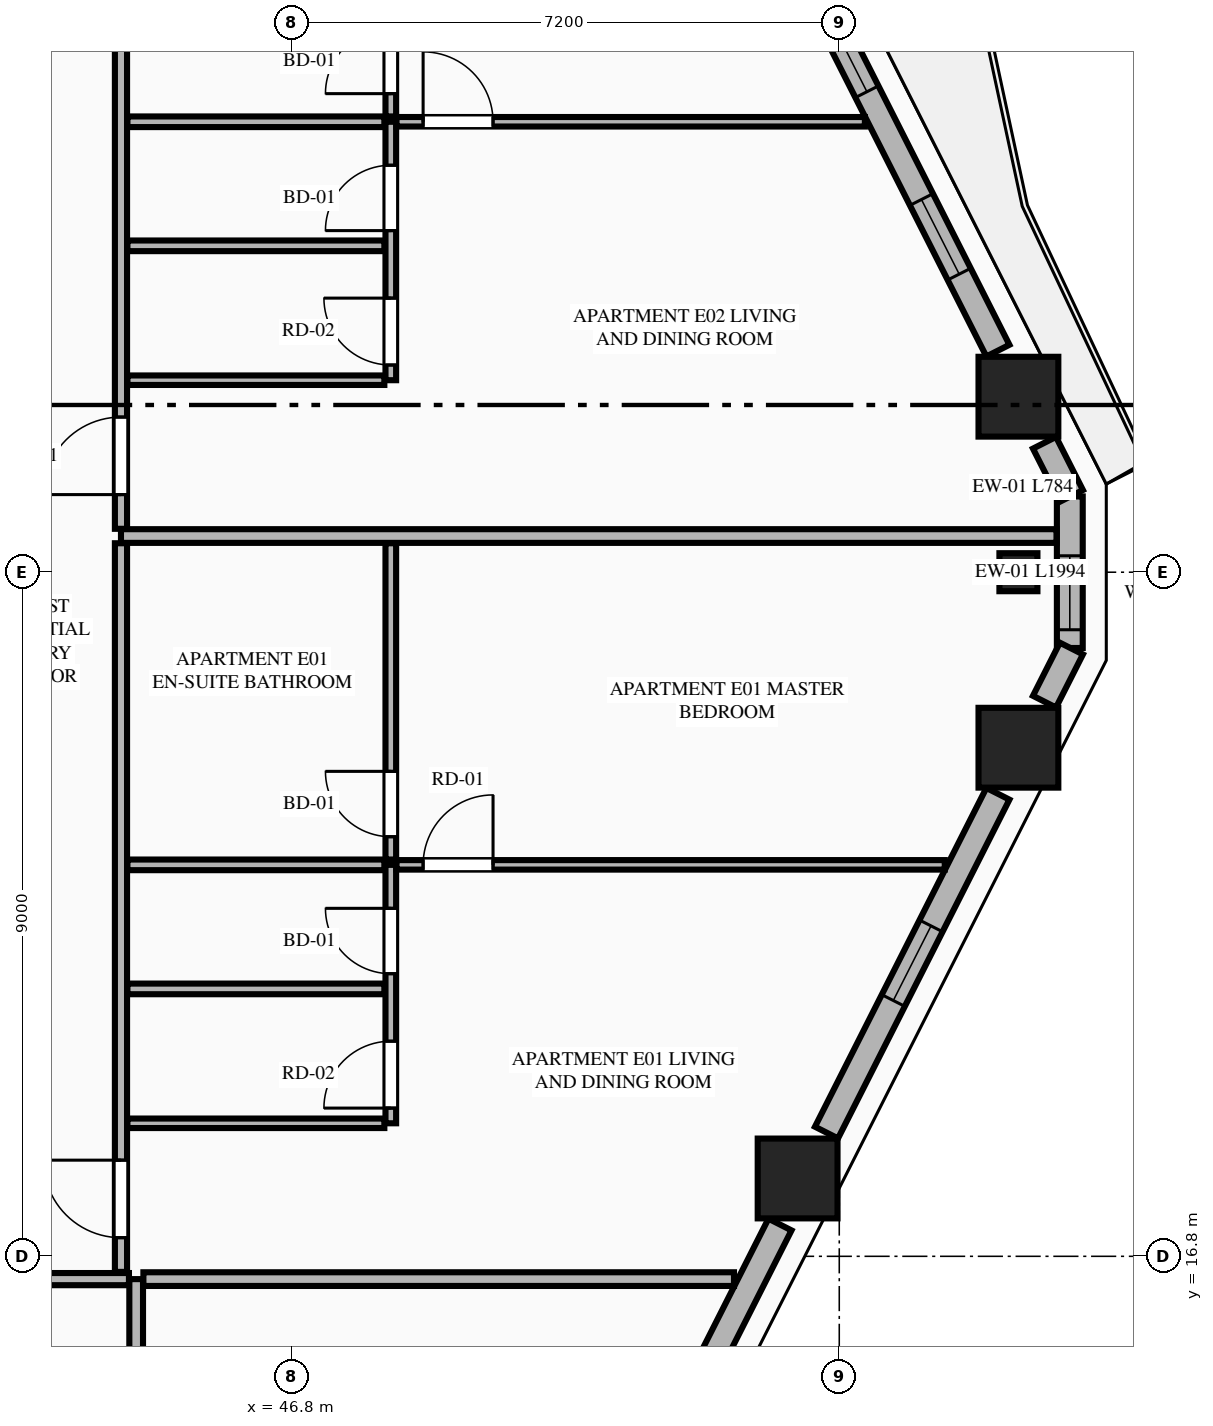
"""IFC4 building model, lengths in metres.
Left out: names, types, materials, properties, quantities, classifications, styles, units other than length and angle.
Written with IfcOpenShell. Run it as: python <this file> out.ifc"""

import sys

from ifc_helpers import new_model, si_unit, direction, frame, frame_2d, origin, origin_2d, place, context, subcontext, project, spatial, rectangle, extrude, element, fill, save


model = new_model("IFC4")
c1 = context("Model", 3, precision=1e-05, world=origin(), true_north=direction((0.0, 1.0)))
c2 = subcontext(c1, "Body", "Model", "MODEL_VIEW")
j1 = project(units=[si_unit("LENGTHUNIT", "METRE"), si_unit("PLANEANGLEUNIT", "RADIAN")], contexts=[c1])
p1 = place(None, origin())
s1 = spatial("IfcSite", under=j1, at=p1, CompositionType="ELEMENT")
p2 = place(p1, origin())
s2 = spatial("IfcBuilding", under=s1, at=p2, CompositionType="ELEMENT")
p3 = place(p2, frame((0.0, 0.0, 109.05)))
s3 = spatial("IfcBuildingStorey", under=s2, at=p3, CompositionType="ELEMENT", Elevation=109.05)
for number, where, z_axis, x_axis in (
    (1, (53.452, 17.824, 0.0), (0.0, 0.0, 1.0), (1.0, 0.0, 0.0)),
    (2, (56.357, 23.491, 0.0), (0.0, 0.0, 1.0), (1.0, 0.0, 0.0)),
    (3, (56.357, 28.109, 0.0), (0.0, 0.0, 1.0), (1.0, 0.0, 0.0)),
):
    element("IfcColumn", number, at=place(p3, frame(where, z_axis=z_axis, x_axis=x_axis)), inside=s3, PredefinedType="COLUMN", context=c2, shape_type="SweptSolid", body=[
        extrude(rectangle(XDim=1.05, YDim=1.05, at=origin_2d()), origin(), (0.0, 0.0, 1.0), 3.55),
    ])
p4 = place(p3, frame((56.357, 25.8, 0.0), z_axis=(0.0, 0.0, 1.0), x_axis=(0.0, 1.0, 0.0)))
e4 = element("IfcColumn", 4, at=p4, inside=s3, PredefinedType="PILASTER", context=c2, shape_type="SweptSolid", body=[
    extrude(rectangle(XDim=0.5, YDim=0.35, at=origin_2d()), origin(), (0.0, 0.0, 1.0), 3.55),
])
p5 = place(p3, frame((57.033, 24.803, 0.0), z_axis=(0.0, 0.0, 1.0), x_axis=(0.0, 1.0, 0.0)))
e5 = element("IfcWall", 5, at=p5, inside=s3, PredefinedType="STANDARD", context=c2, shape_type="SweptSolid", body=[
    extrude(rectangle(XDim=1.994, YDim=0.34, at=frame_2d((0.997, 0.0))), origin(), (0.0, 0.0, 1.0), 3.34),
])
p6 = place(p5, frame((0.24, 0.0, 0.75)))
e6 = element("IfcOpeningElement", 6, at=p6, cuts=e5, PredefinedType="OPENING", context=c2, shape_type="SweptSolid", body=[
    extrude(rectangle(XDim=0.973, YDim=2.0, at=frame_2d((0.486, 1.0))), frame((0.0, 0.18, 0.0), z_axis=(0.0, -1.0, 0.0), x_axis=(1.0, 0.0, 0.0)), (0.0, 0.0, 1.0), 0.36),
])
p7 = place(p3, frame((50.863, 12.561, 0.0), z_axis=(0.0, 0.0, 1.0), x_axis=(0.451567731634, 0.892236842855, 0.0)))
e7 = element("IfcWall", 7, at=p7, inside=s3, PredefinedType="STANDARD", context=c2, shape_type="SweptSolid", body=[
    extrude(rectangle(XDim=5.219, YDim=0.34, at=frame_2d((2.61, 0.0))), origin(), (0.0, 0.0, 1.0), 2.797),
])
p8 = place(p7, frame((2.06, 0.0, 0.75)))
e8 = element("IfcOpeningElement", 8, at=p8, cuts=e7, PredefinedType="OPENING", context=c2, shape_type="SweptSolid", body=[
    extrude(rectangle(XDim=1.1, YDim=1.897, at=frame_2d((0.55, 0.948))), frame((0.0, 0.18, 0.0), z_axis=(0.0, -1.0, 0.0), x_axis=(1.0, 0.0, 0.0)), (0.0, 0.0, 1.0), 0.36),
])
p9 = place(p3, frame((53.832, 18.428, 0.0), z_axis=(0.0, 0.0, 1.0), x_axis=(0.451431617681, 0.892305718102, 0.0)))
e9 = element("IfcWall", 9, at=p9, inside=s3, PredefinedType="STANDARD", context=c2, shape_type="SweptSolid", body=[
    extrude(rectangle(XDim=4.995, YDim=0.34, at=frame_2d((2.498, 0.0))), origin(), (0.0, 0.0, 1.0), 2.797),
])
p10 = place(p9, frame((1.947, 0.0, 0.75)))
e10 = element("IfcOpeningElement", 10, at=p10, cuts=e9, PredefinedType="OPENING", context=c2, shape_type="SweptSolid", body=[
    extrude(rectangle(XDim=1.1, YDim=1.897, at=frame_2d((0.55, 0.948))), frame((0.0, 0.18, 0.0), z_axis=(0.0, -1.0, 0.0), x_axis=(1.0, 0.0, 0.0)), (0.0, 0.0, 1.0), 0.36),
])
for number, where, z_axis, x_axis in (
    (11, (56.7, 24.097, 0.0), (0.0, 0.0, 1.0), (0.452, 0.892, 0.0)),
    (12, (57.054, 26.804, 0.0), (0.0, 0.0, 1.0), (-0.452, 0.892, 0.0)),
):
    element("IfcWall", number, at=place(p3, frame(where, z_axis=z_axis, x_axis=x_axis)), inside=s3, PredefinedType="STANDARD", context=c2, shape_type="SweptSolid", body=[
        extrude(rectangle(XDim=0.783, YDim=0.34, at=frame_2d((0.392, 0.0))), origin(), (0.0, 0.0, 1.0), 3.34),
    ])
p11 = place(p3, frame((56.087, 28.715, 0.0), z_axis=(0.0, 0.0, 1.0), x_axis=(-0.451431617681, 0.892305718102, 0.0)))
e13 = element("IfcWall", 13, at=p11, inside=s3, PredefinedType="STANDARD", context=c2, shape_type="SweptSolid", body=[
    extrude(rectangle(XDim=4.995, YDim=0.34, at=frame_2d((2.498, 0.0))), origin(), (0.0, 0.0, 1.0), 2.797),
])
p12 = place(p11, frame((1.128, 0.0, 0.75)))
e14 = element("IfcOpeningElement", 14, at=p12, cuts=e13, PredefinedType="OPENING", context=c2, shape_type="SweptSolid", body=[
    extrude(rectangle(XDim=1.1, YDim=1.897, at=frame_2d((0.55, 0.948))), frame((0.0, 0.18, 0.0), z_axis=(0.0, -1.0, 0.0), x_axis=(1.0, 0.0, 0.0)), (0.0, 0.0, 1.0), 0.36),
])
p13 = place(p11, frame((3.817, 0.0, 0.75)))
e15 = element("IfcOpeningElement", 15, at=p13, cuts=e13, PredefinedType="OPENING", context=c2, shape_type="SweptSolid", body=[
    extrude(rectangle(XDim=0.958, YDim=1.897, at=frame_2d((0.479, 0.948))), frame((0.0, 0.18, 0.0), z_axis=(0.0, -1.0, 0.0), x_axis=(1.0, 0.0, 0.0)), (0.0, 0.0, 1.0), 0.36),
])
p14 = place(p3, frame((44.75, 4.105, 0.0), z_axis=(0.0, 0.0, 1.0), x_axis=(0.0, 1.0, 0.0)))
e16 = element("IfcWall", 16, at=p14, inside=s3, PredefinedType="PARTITIONING", context=c2, shape_type="SweptSolid", body=[
    extrude(rectangle(XDim=12.395, YDim=0.18, at=frame_2d((6.198, 0.0))), origin(), (0.0, 0.0, 1.0), 3.34),
])
p15 = place(p3, frame((36.327, 16.5, 0.0), z_axis=(0.0, 0.0, 1.0), x_axis=(1.0, 0.0, 0.0)))
e17 = element("IfcWall", 17, at=p15, inside=s3, PredefinedType="PARTITIONING", context=c2, shape_type="SweptSolid", body=[
    extrude(rectangle(XDim=8.328, YDim=0.16, at=frame_2d((4.164, 0.0))), origin(), (0.0, 0.0, 1.0), 3.34),
])
p16 = place(p15, frame((6.073, 0.0, 0.0)))
e18 = element("IfcOpeningElement", 18, at=p16, cuts=e17, PredefinedType="OPENING", context=c2, shape_type="SweptSolid", body=[
    extrude(rectangle(XDim=1.02, YDim=2.25, at=frame_2d((0.51, 1.125))), frame((0.0, 0.09, 0.0), z_axis=(0.0, -1.0, 0.0), x_axis=(1.0, 0.0, 0.0)), (0.0, 0.0, 1.0), 0.18),
])
p17 = place(p3, frame((44.845, 16.5, 0.0), z_axis=(0.0, 0.0, 1.0), x_axis=(1.0, 0.0, 0.0)))
e19 = element("IfcWall", 19, at=p17, inside=s3, PredefinedType="PARTITIONING", context=c2, shape_type="SweptSolid", body=[
    extrude(rectangle(XDim=7.77, YDim=0.18, at=frame_2d((3.885, 0.0))), origin(), (0.0, 0.0, 1.0), 3.34),
])
p18 = place(p3, frame((44.55, 16.595, 0.0), z_axis=(0.0, 0.0, 1.0), x_axis=(0.0, 1.0, 0.0)))
e20 = element("IfcWall", 20, at=p18, inside=s3, PredefinedType="PARTITIONING", context=c2, shape_type="SweptSolid", body=[
    extrude(rectangle(XDim=9.586, YDim=0.16, at=frame_2d((4.793, 0.0))), origin(), (0.0, 0.0, 1.0), 3.34),
])
p19 = place(p18, frame((0.45, 0.0, 0.0)))
e21 = element("IfcOpeningElement", 21, at=p19, cuts=e20, PredefinedType="OPENING", context=c2, shape_type="SweptSolid", body=[
    extrude(rectangle(XDim=1.02, YDim=2.25, at=frame_2d((0.51, 1.125))), frame((0.0, 0.09, 0.0), z_axis=(0.0, -1.0, 0.0), x_axis=(1.0, 0.0, 0.0)), (0.0, 0.0, 1.0), 0.18),
])
p20 = place(p3, frame((44.635, 18.55, 0.0), z_axis=(0.0, 0.0, 1.0), x_axis=(1.0, 0.0, 0.0)))
e22 = element("IfcWall", 22, at=p20, inside=s3, PredefinedType="PARTITIONING", context=c2, shape_type="SweptSolid", body=[
    extrude(rectangle(XDim=3.38, YDim=0.125, at=frame_2d((1.69, 0.0))), origin(), (0.0, 0.0, 1.0), 2.722),
])
p21 = place(p3, frame((48.1, 18.55, 0.0), z_axis=(0.0, 0.0, 1.0), x_axis=(0.0, 1.0, 0.0)))
e23 = element("IfcWall", 23, at=p21, inside=s3, PredefinedType="PLUMBINGWALL", context=c2, shape_type="SweptSolid", body=[
    extrude(rectangle(XDim=3.4, YDim=0.14, at=frame_2d((1.7, 0.0))), origin(), (0.0, 0.0, 1.0), 3.34),
])
p22 = place(p21, frame((0.2, 0.0, 0.0)))
e24 = element("IfcOpeningElement", 24, at=p22, cuts=e23, PredefinedType="OPENING", context=c2, shape_type="SweptSolid", body=[
    extrude(rectangle(XDim=0.88, YDim=2.15, at=frame_2d((0.44, 1.075))), frame((0.0, 0.08, 0.0), z_axis=(0.0, -1.0, 0.0), x_axis=(1.0, 0.0, 0.0)), (0.0, 0.0, 1.0), 0.16),
])
p23 = place(p21, frame((1.968, 0.0, 0.0)))
e25 = element("IfcOpeningElement", 25, at=p23, cuts=e23, PredefinedType="OPENING", context=c2, shape_type="SweptSolid", body=[
    extrude(rectangle(XDim=0.86, YDim=2.1, at=frame_2d((0.43, 1.05))), frame((0.0, 0.08, 0.0), z_axis=(0.0, -1.0, 0.0), x_axis=(1.0, 0.0, 0.0)), (0.0, 0.0, 1.0), 0.16),
])
p24 = place(p3, frame((48.1, 22.02, 0.0), z_axis=(0.0, 0.0, 1.0), x_axis=(0.0, 1.0, 0.0)))
e26 = element("IfcWall", 26, at=p24, inside=s3, PredefinedType="PLUMBINGWALL", context=c2, shape_type="SweptSolid", body=[
    extrude(rectangle(XDim=4.161, YDim=0.14, at=frame_2d((2.081, 0.0))), origin(), (0.0, 0.0, 1.0), 3.34),
])
p25 = place(p24, frame((0.3, 0.0, 0.0)))
e27 = element("IfcOpeningElement", 27, at=p25, cuts=e26, PredefinedType="OPENING", context=c2, shape_type="SweptSolid", body=[
    extrude(rectangle(XDim=0.86, YDim=2.1, at=frame_2d((0.43, 1.05))), frame((0.0, 0.08, 0.0), z_axis=(0.0, -1.0, 0.0), x_axis=(1.0, 0.0, 0.0)), (0.0, 0.0, 1.0), 0.16),
])
p26 = place(p3, frame((44.635, 21.95, 0.0), z_axis=(0.0, 0.0, 1.0), x_axis=(1.0, 0.0, 0.0)))
e28 = element("IfcWall", 28, at=p26, inside=s3, PredefinedType="PLUMBINGWALL", context=c2, shape_type="SweptSolid", body=[
    extrude(rectangle(XDim=3.38, YDim=0.14, at=frame_2d((1.69, 0.0))), origin(), (0.0, 0.0, 1.0), 3.34),
])
p27 = place(p3, frame((48.175, 21.95, 0.0), z_axis=(0.0, 0.0, 1.0), x_axis=(1.0, 0.0, 0.0)))
e29 = element("IfcWall", 29, at=p27, inside=s3, PredefinedType="PARTITIONING", context=c2, shape_type="SweptSolid", body=[
    extrude(rectangle(XDim=7.213, YDim=0.125, at=frame_2d((3.606, 0.0))), origin(), (0.0, 0.0, 1.0), 3.34),
])
p28 = place(p27, frame((0.35, 0.0, 0.0)))
e30 = element("IfcOpeningElement", 30, at=p28, cuts=e29, PredefinedType="OPENING", context=c2, shape_type="SweptSolid", body=[
    extrude(rectangle(XDim=0.92, YDim=2.15, at=frame_2d((0.46, 1.075))), frame((0.0, 0.073, 0.0), z_axis=(0.0, -1.0, 0.0), x_axis=(1.0, 0.0, 0.0)), (0.0, 0.0, 1.0), 0.145),
])
p29 = place(p3, frame((44.635, 20.318, 0.0), z_axis=(0.0, 0.0, 1.0), x_axis=(1.0, 0.0, 0.0)))
e31 = element("IfcWall", 31, at=p29, inside=s3, PredefinedType="PLUMBINGWALL", context=c2, shape_type="SweptSolid", body=[
    extrude(rectangle(XDim=3.38, YDim=0.14, at=frame_2d((1.69, 0.0))), origin(), (0.0, 0.0, 1.0), 3.34),
])
p30 = place(p3, frame((44.55, 26.276, 0.0), z_axis=(0.0, 0.0, 1.0), x_axis=(1.0, 0.0, 0.0)))
e32 = element("IfcWall", 32, at=p30, inside=s3, PredefinedType="PARTITIONING", context=c2, shape_type="SweptSolid", body=[
    extrude(rectangle(XDim=12.308, YDim=0.18, at=frame_2d((6.154, 0.0))), origin(), (0.0, 0.0, 1.0), 3.34),
])
p31 = place(p3, frame((44.55, 26.371, 0.0), z_axis=(0.0, 0.0, 1.0), x_axis=(0.0, 1.0, 0.0)))
e33 = element("IfcWall", 33, at=p31, inside=s3, PredefinedType="PARTITIONING", context=c2, shape_type="SweptSolid", body=[
    extrude(rectangle(XDim=8.834, YDim=0.16, at=frame_2d((4.417, 0.0))), origin(), (0.0, 0.0, 1.0), 3.34),
])
p32 = place(p31, frame((0.45, 0.0, 0.0)))
e34 = element("IfcOpeningElement", 34, at=p32, cuts=e33, PredefinedType="OPENING", context=c2, shape_type="SweptSolid", body=[
    extrude(rectangle(XDim=1.02, YDim=2.25, at=frame_2d((0.51, 1.125))), frame((0.0, 0.09, 0.0), z_axis=(0.0, -1.0, 0.0), x_axis=(1.0, 0.0, 0.0)), (0.0, 0.0, 1.0), 0.18),
])
p33 = place(p3, frame((44.635, 28.326, 0.0), z_axis=(0.0, 0.0, 1.0), x_axis=(1.0, 0.0, 0.0)))
e35 = element("IfcWall", 35, at=p33, inside=s3, PredefinedType="PARTITIONING", context=c2, shape_type="SweptSolid", body=[
    extrude(rectangle(XDim=3.38, YDim=0.125, at=frame_2d((1.69, 0.0))), origin(), (0.0, 0.0, 1.0), 3.34),
])
p34 = place(p3, frame((48.1, 28.326, 0.0), z_axis=(0.0, 0.0, 1.0), x_axis=(0.0, 1.0, 0.0)))
e36 = element("IfcWall", 36, at=p34, inside=s3, PredefinedType="PLUMBINGWALL", context=c2, shape_type="SweptSolid", body=[
    extrude(rectangle(XDim=3.4, YDim=0.14, at=frame_2d((1.7, 0.0))), origin(), (0.0, 0.0, 1.0), 3.34),
])
p35 = place(p34, frame((0.2, 0.0, 0.0)))
e37 = element("IfcOpeningElement", 37, at=p35, cuts=e36, PredefinedType="OPENING", context=c2, shape_type="SweptSolid", body=[
    extrude(rectangle(XDim=0.88, YDim=2.15, at=frame_2d((0.44, 1.075))), frame((0.0, 0.08, 0.0), z_axis=(0.0, -1.0, 0.0), x_axis=(1.0, 0.0, 0.0)), (0.0, 0.0, 1.0), 0.16),
])
p36 = place(p34, frame((1.968, 0.0, 0.0)))
e38 = element("IfcOpeningElement", 38, at=p36, cuts=e36, PredefinedType="OPENING", context=c2, shape_type="SweptSolid", body=[
    extrude(rectangle(XDim=0.86, YDim=2.1, at=frame_2d((0.43, 1.05))), frame((0.0, 0.08, 0.0), z_axis=(0.0, -1.0, 0.0), x_axis=(1.0, 0.0, 0.0)), (0.0, 0.0, 1.0), 0.16),
])
p37 = place(p3, frame((48.1, 31.796, 0.0), z_axis=(0.0, 0.0, 1.0), x_axis=(0.0, 1.0, 0.0)))
e39 = element("IfcWall", 39, at=p37, inside=s3, PredefinedType="PLUMBINGWALL", context=c2, shape_type="SweptSolid", body=[
    extrude(rectangle(XDim=3.409, YDim=0.14, at=frame_2d((1.705, 0.0))), origin(), (0.0, 0.0, 1.0), 3.34),
])
p38 = place(p37, frame((0.3, 0.0, 0.0)))
e40 = element("IfcOpeningElement", 40, at=p38, cuts=e39, PredefinedType="OPENING", context=c2, shape_type="SweptSolid", body=[
    extrude(rectangle(XDim=0.86, YDim=2.1, at=frame_2d((0.43, 1.05))), frame((0.0, 0.08, 0.0), z_axis=(0.0, -1.0, 0.0), x_axis=(1.0, 0.0, 0.0)), (0.0, 0.0, 1.0), 0.16),
])
p39 = place(p3, frame((44.635, 31.726, 0.0), z_axis=(0.0, 0.0, 1.0), x_axis=(1.0, 0.0, 0.0)))
e41 = element("IfcWall", 41, at=p39, inside=s3, PredefinedType="PLUMBINGWALL", context=c2, shape_type="SweptSolid", body=[
    extrude(rectangle(XDim=3.38, YDim=0.14, at=frame_2d((1.69, 0.0))), origin(), (0.0, 0.0, 1.0), 3.34),
])
p40 = place(p3, frame((48.175, 31.726, 0.0), z_axis=(0.0, 0.0, 1.0), x_axis=(1.0, 0.0, 0.0)))
e42 = element("IfcWall", 42, at=p40, inside=s3, PredefinedType="PARTITIONING", context=c2, shape_type="SweptSolid", body=[
    extrude(rectangle(XDim=6.162, YDim=0.125, at=frame_2d((3.081, 0.0))), origin(), (0.0, 0.0, 1.0), 3.34),
])
p41 = place(p40, frame((0.35, 0.0, 0.0)))
e43 = element("IfcOpeningElement", 43, at=p41, cuts=e42, PredefinedType="OPENING", context=c2, shape_type="SweptSolid", body=[
    extrude(rectangle(XDim=0.92, YDim=2.15, at=frame_2d((0.46, 1.075))), frame((0.0, 0.073, 0.0), z_axis=(0.0, -1.0, 0.0), x_axis=(1.0, 0.0, 0.0)), (0.0, 0.0, 1.0), 0.145),
])
p42 = place(p3, frame((44.635, 30.094, 0.0), z_axis=(0.0, 0.0, 1.0), x_axis=(1.0, 0.0, 0.0)))
e44 = element("IfcWall", 44, at=p42, inside=s3, PredefinedType="PLUMBINGWALL", context=c2, shape_type="SweptSolid", body=[
    extrude(rectangle(XDim=3.38, YDim=0.14, at=frame_2d((1.69, 0.0))), origin(), (0.0, 0.0, 1.0), 3.34),
])
p43 = place(p10, origin())
e45 = element("IfcWindow", 45, at=p43, inside=s3, PartitioningType="SINGLE_PANEL", PredefinedType="WINDOW", context=c2, shape_type="SweptSolid", body=[
    extrude(rectangle(XDim=1.1, YDim=1.897, at=frame_2d((0.55, 0.948))), frame((0.0, 0.03, 0.0), z_axis=(0.0, -1.0, 0.0), x_axis=(1.0, 0.0, 0.0)), (0.0, 0.0, 1.0), 0.06),
])
fill(e10, e45)
p44 = place(p12, origin())
e46 = element("IfcWindow", 46, at=p44, inside=s3, PartitioningType="SINGLE_PANEL", PredefinedType="WINDOW", context=c2, shape_type="SweptSolid", body=[
    extrude(rectangle(XDim=1.1, YDim=1.897, at=frame_2d((0.55, 0.948))), frame((0.0, 0.03, 0.0), z_axis=(0.0, -1.0, 0.0), x_axis=(1.0, 0.0, 0.0)), (0.0, 0.0, 1.0), 0.06),
])
fill(e14, e46)
p45 = place(p22, origin())
e47 = element("IfcDoor", 47, at=p45, inside=s3, OperationType="SINGLE_SWING_LEFT", PredefinedType="DOOR", context=c2, shape_type="SweptSolid", body=[
    extrude(rectangle(XDim=0.88, YDim=2.15, at=frame_2d((0.44, 1.075))), frame((0.0, 0.025, 0.0), z_axis=(0.0, -1.0, 0.0), x_axis=(1.0, 0.0, 0.0)), (0.0, 0.0, 1.0), 0.05),
])
fill(e24, e47)
p46 = place(p23, origin())
e48 = element("IfcDoor", 48, at=p46, inside=s3, OperationType="SINGLE_SWING_RIGHT", PredefinedType="DOOR", context=c2, shape_type="SweptSolid", body=[
    extrude(rectangle(XDim=0.86, YDim=2.1, at=frame_2d((0.43, 1.05))), frame((0.0, 0.025, 0.0), z_axis=(0.0, -1.0, 0.0), x_axis=(1.0, 0.0, 0.0)), (0.0, 0.0, 1.0), 0.05),
])
fill(e25, e48)
p47 = place(p25, origin())
e49 = element("IfcDoor", 49, at=p47, inside=s3, OperationType="SINGLE_SWING_RIGHT", PredefinedType="DOOR", context=c2, shape_type="SweptSolid", body=[
    extrude(rectangle(XDim=0.86, YDim=2.1, at=frame_2d((0.43, 1.05))), frame((0.0, 0.025, 0.0), z_axis=(0.0, -1.0, 0.0), x_axis=(1.0, 0.0, 0.0)), (0.0, 0.0, 1.0), 0.05),
])
fill(e27, e49)
p48 = place(p19, origin())
e50 = element("IfcDoor", 50, at=p48, inside=s3, OperationType="SINGLE_SWING_RIGHT", PredefinedType="DOOR", context=c2, shape_type="SweptSolid", body=[
    extrude(rectangle(XDim=1.02, YDim=2.25, at=frame_2d((0.51, 1.125))), frame((0.0, 0.025, 0.0), z_axis=(0.0, -1.0, 0.0), x_axis=(1.0, 0.0, 0.0)), (0.0, 0.0, 1.0), 0.05),
])
fill(e21, e50)
p49 = place(p28, origin())
e51 = element("IfcDoor", 51, at=p49, inside=s3, OperationType="SINGLE_SWING_RIGHT", PredefinedType="DOOR", context=c2, shape_type="SweptSolid", body=[
    extrude(rectangle(XDim=0.92, YDim=2.15, at=frame_2d((0.46, 1.075))), frame((0.0, 0.025, 0.0), z_axis=(0.0, -1.0, 0.0), x_axis=(1.0, 0.0, 0.0)), (0.0, 0.0, 1.0), 0.05),
])
fill(e30, e51)
p50 = place(p35, origin())
e52 = element("IfcDoor", 52, at=p50, inside=s3, OperationType="SINGLE_SWING_RIGHT", PredefinedType="DOOR", context=c2, shape_type="SweptSolid", body=[
    extrude(rectangle(XDim=0.88, YDim=2.15, at=frame_2d((0.44, 1.075))), frame((0.0, 0.025, 0.0), z_axis=(0.0, -1.0, 0.0), x_axis=(1.0, 0.0, 0.0)), (0.0, 0.0, 1.0), 0.05),
])
fill(e37, e52)
p51 = place(p36, origin())
e53 = element("IfcDoor", 53, at=p51, inside=s3, OperationType="SINGLE_SWING_LEFT", PredefinedType="DOOR", context=c2, shape_type="SweptSolid", body=[
    extrude(rectangle(XDim=0.86, YDim=2.1, at=frame_2d((0.43, 1.05))), frame((0.0, 0.025, 0.0), z_axis=(0.0, -1.0, 0.0), x_axis=(1.0, 0.0, 0.0)), (0.0, 0.0, 1.0), 0.05),
])
fill(e38, e53)
p52 = place(p38, origin())
e54 = element("IfcDoor", 54, at=p52, inside=s3, OperationType="SINGLE_SWING_LEFT", PredefinedType="DOOR", context=c2, shape_type="SweptSolid", body=[
    extrude(rectangle(XDim=0.86, YDim=2.1, at=frame_2d((0.43, 1.05))), frame((0.0, 0.025, 0.0), z_axis=(0.0, -1.0, 0.0), x_axis=(1.0, 0.0, 0.0)), (0.0, 0.0, 1.0), 0.05),
])
fill(e40, e54)
p53 = place(p32, origin())
e55 = element("IfcDoor", 55, at=p53, inside=s3, OperationType="SINGLE_SWING_LEFT", PredefinedType="DOOR", context=c2, shape_type="SweptSolid", body=[
    extrude(rectangle(XDim=1.02, YDim=2.25, at=frame_2d((0.51, 1.125))), frame((0.0, 0.025, 0.0), z_axis=(0.0, -1.0, 0.0), x_axis=(1.0, 0.0, 0.0)), (0.0, 0.0, 1.0), 0.05),
])
fill(e34, e55)
p54 = place(p41, origin())
e56 = element("IfcDoor", 56, at=p54, inside=s3, OperationType="SINGLE_SWING_LEFT", PredefinedType="DOOR", context=c2, shape_type="SweptSolid", body=[
    extrude(rectangle(XDim=0.92, YDim=2.15, at=frame_2d((0.46, 1.075))), frame((0.0, 0.025, 0.0), z_axis=(0.0, -1.0, 0.0), x_axis=(1.0, 0.0, 0.0)), (0.0, 0.0, 1.0), 0.05),
])
fill(e43, e56)
p55 = place(p13, origin())
e57 = element("IfcWindow", 57, at=p55, inside=s3, PartitioningType="SINGLE_PANEL", PredefinedType="WINDOW", context=c2, shape_type="SweptSolid", body=[
    extrude(rectangle(XDim=0.958, YDim=1.897, at=frame_2d((0.479, 0.948))), frame((0.0, 0.03, 0.0), z_axis=(0.0, -1.0, 0.0), x_axis=(1.0, 0.0, 0.0)), (0.0, 0.0, 1.0), 0.06),
])
fill(e15, e57)
p56 = place(p6, origin())
e58 = element("IfcWindow", 58, at=p56, inside=s3, PartitioningType="SINGLE_PANEL", PredefinedType="WINDOW", context=c2, shape_type="SweptSolid", body=[
    extrude(rectangle(XDim=0.973, YDim=2.0, at=frame_2d((0.486, 1.0))), frame((0.0, 0.03, 0.0), z_axis=(0.0, -1.0, 0.0), x_axis=(1.0, 0.0, 0.0)), (0.0, 0.0, 1.0), 0.06),
])
fill(e6, e58)
save(model, sys.argv[1])
